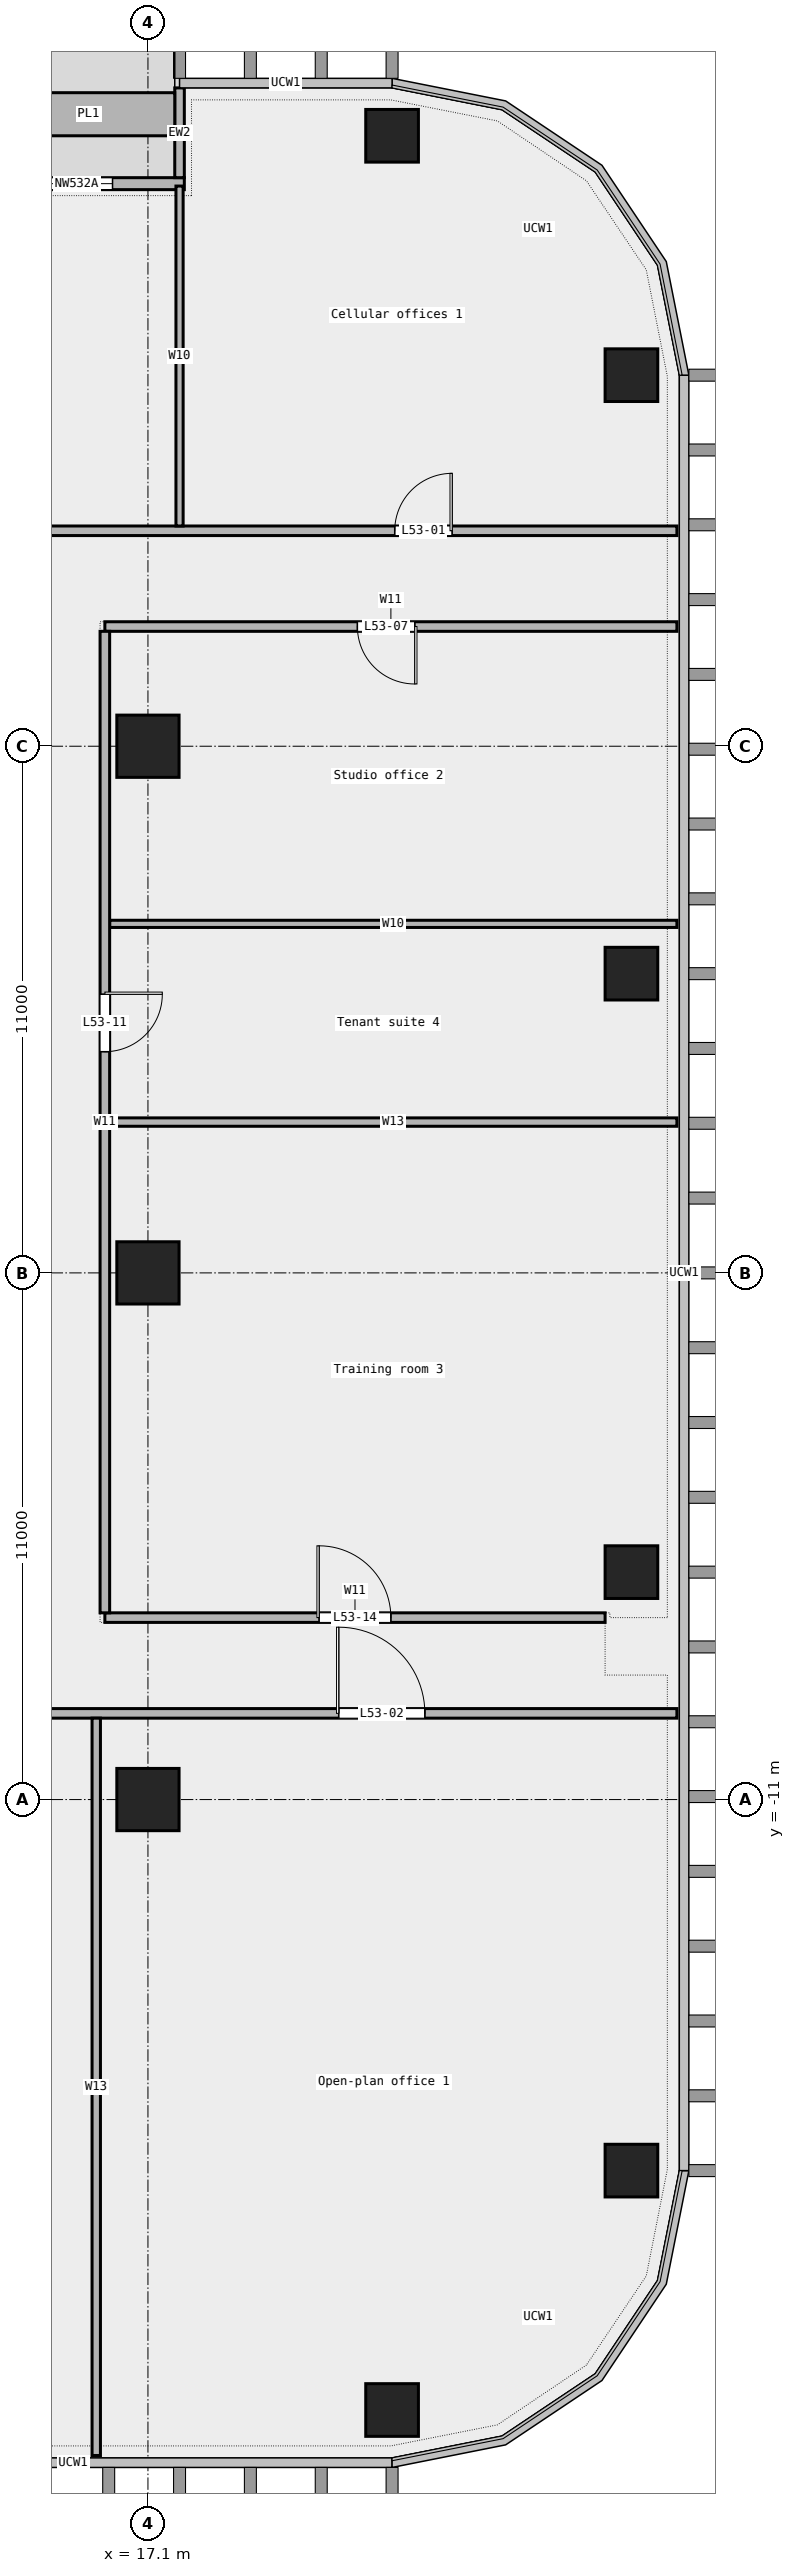
"""IFC4 building model, lengths in metres.
Left out: names, types, materials, properties, quantities, classifications, styles, units other than length and angle.
Written with IfcOpenShell. Run it as: python <this file> out.ifc"""

import sys

from ifc_helpers import new_model, si_unit, direction, frame, frame_2d, origin, origin_2d, place, context, subcontext, project, spatial, rectangle, extrude, element, fill, save


model = new_model("IFC4")
c1 = context("Model", 3, precision=1e-05, world=origin(), true_north=direction((0.0, 1.0)))
c2 = subcontext(c1, "Body", "Model", "MODEL_VIEW")
j1 = project(units=[si_unit("LENGTHUNIT", "METRE"), si_unit("PLANEANGLEUNIT", "RADIAN")], contexts=[c1])
p1 = place(None, origin())
s1 = spatial("IfcSite", under=j1, at=p1, CompositionType="ELEMENT")
p2 = place(p1, origin())
s2 = spatial("IfcBuilding", under=s1, at=p2, CompositionType="ELEMENT")
p3 = place(p2, frame((0.0, 0.0, 247.0)))
s3 = spatial("IfcBuildingStorey", under=s2, at=p3, CompositionType="ELEMENT", Elevation=247.0)
for number, where, z_axis, x_axis in (
    (1, (22.2, -23.75, 0.0), (0.0, 0.0, 1.0), (1.0, 0.0, 0.0)),
    (2, (27.2, -18.75, 0.0), (0.0, 0.0, 1.0), (1.0, 0.0, 0.0)),
    (3, (27.2, -6.25, 0.0), (0.0, 0.0, 1.0), (1.0, 0.0, 0.0)),
    (4, (27.2, 6.25, 0.0), (0.0, 0.0, 1.0), (1.0, 0.0, 0.0)),
    (5, (27.2, 18.75, 0.0), (0.0, 0.0, 1.0), (1.0, 0.0, 0.0)),
    (6, (22.2, 23.75, 0.0), (0.0, 0.0, 1.0), (1.0, 0.0, 0.0)),
):
    element("IfcColumn", number, at=place(p3, frame(where, z_axis=z_axis, x_axis=x_axis)), inside=s3, PredefinedType="COLUMN", context=c2, shape_type="SweptSolid", body=[
        extrude(rectangle(XDim=1.1, YDim=1.1, at=origin_2d()), origin(), (0.0, 0.0, 1.0), 3.6),
    ])
for number, where, z_axis, x_axis in (
    (7, (17.1, -11.0, 0.0), (0.0, 0.0, 1.0), (1.0, 0.0, 0.0)),
    (8, (17.1, 0.0, 0.0), (0.0, 0.0, 1.0), (1.0, 0.0, 0.0)),
    (9, (17.1, 11.0, 0.0), (0.0, 0.0, 1.0), (1.0, 0.0, 0.0)),
):
    element("IfcColumn", number, at=place(p3, frame(where, z_axis=z_axis, x_axis=x_axis)), inside=s3, PredefinedType="COLUMN", context=c2, shape_type="SweptSolid", body=[
        extrude(rectangle(XDim=1.3, YDim=1.3, at=origin_2d()), origin(), (0.0, 0.0, 1.0), 3.6),
    ])
p4 = place(p3, frame((17.86, 22.75, 0.0), z_axis=(0.0, 0.0, 1.0), x_axis=(-1.0, 0.0, 0.0)))
e10 = element("IfcWall", 10, at=p4, inside=s3, PredefinedType="STANDARD", context=c2, shape_type="SweptSolid", body=[
    extrude(rectangle(XDim=13.52, YDim=0.25, at=frame_2d((6.76, 0.0))), origin(), (0.0, 0.0, 1.0), 3.6),
])
p5 = place(p4, frame((1.5, 0.0, 0.45)))
e11 = element("IfcOpeningElement", 11, at=p5, cuts=e10, PredefinedType="OPENING", context=c2, shape_type="SweptSolid", body=[
    extrude(rectangle(XDim=1.5, YDim=2.4, at=frame_2d((0.75, 1.2))), frame((0.0, 0.137, 0.0), z_axis=(0.0, -1.0, 0.0), x_axis=(1.0, 0.0, 0.0)), (0.0, 0.0, 1.0), 0.274),
])
p6 = place(p4, frame((4.0, 0.0, 0.0)))
e12 = element("IfcOpeningElement", 12, at=p6, cuts=e10, PredefinedType="OPENING", context=c2, shape_type="SweptSolid", body=[
    extrude(rectangle(XDim=1.8, YDim=2.4, at=frame_2d((0.9, 1.2))), frame((0.0, 0.137, 0.0), z_axis=(0.0, -1.0, 0.0), x_axis=(1.0, 0.0, 0.0)), (0.0, 0.0, 1.0), 0.274),
])
p7 = place(p4, frame((10.5, 0.0, 0.45)))
e13 = element("IfcOpeningElement", 13, at=p7, cuts=e10, PredefinedType="OPENING", context=c2, shape_type="SweptSolid", body=[
    extrude(rectangle(XDim=1.5, YDim=2.4, at=frame_2d((0.75, 1.2))), frame((0.0, 0.137, 0.0), z_axis=(0.0, -1.0, 0.0), x_axis=(1.0, 0.0, 0.0)), (0.0, 0.0, 1.0), 0.274),
])
p8 = place(p3, frame((17.76, 24.75, 0.0), z_axis=(0.0, 0.0, 1.0), x_axis=(0.0, -1.0, 0.0)))
e14 = element("IfcWall", 14, at=p8, inside=s3, PredefinedType="STANDARD", context=c2, shape_type="SweptSolid", body=[
    extrude(rectangle(XDim=1.875, YDim=0.2, at=frame_2d((0.938, 0.0))), origin(), (0.0, 0.0, 1.0), 3.6),
])
p9 = place(p3, frame((17.66, 24.2, 0.0), z_axis=(0.0, 0.0, 1.0), x_axis=(-1.0, 0.0, 0.0)))
e15 = element("IfcWall", 15, at=p9, inside=s3, PredefinedType="STANDARD", context=c2, shape_type="SweptSolid", body=[
    extrude(rectangle(XDim=3.6, YDim=0.9, at=frame_2d((1.8, 0.0))), origin(), (0.0, 0.0, 1.0), 0.7),
])
p10 = place(p3, frame((-4.44, -9.2, 0.0), z_axis=(0.0, 0.0, 1.0), x_axis=(1.0, 0.0, 0.0)))
e16 = element("IfcWall", 16, at=p10, inside=s3, PredefinedType="PARTITIONING", context=c2, shape_type="SweptSolid", body=[
    extrude(rectangle(XDim=32.59, YDim=0.2, at=frame_2d((16.295, 0.0))), origin(), (0.0, 0.0, 1.0), 3.6),
])
p11 = place(p10, frame((25.525, 0.0, 0.0)))
e17 = element("IfcOpeningElement", 17, at=p11, cuts=e16, PredefinedType="OPENING", context=c2, shape_type="SweptSolid", body=[
    extrude(rectangle(XDim=1.8, YDim=2.1, at=frame_2d((0.9, 1.05))), frame((0.0, 0.112, 0.0), z_axis=(0.0, -1.0, 0.0), x_axis=(1.0, 0.0, 0.0)), (0.0, 0.0, 1.0), 0.224),
])
p12 = place(p10, frame((5.76, 0.0, 0.0)))
e18 = element("IfcOpeningElement", 18, at=p12, cuts=e16, PredefinedType="OPENING", context=c2, shape_type="SweptSolid", body=[
    extrude(rectangle(XDim=1.8, YDim=2.1, at=frame_2d((0.9, 1.05))), frame((0.0, 0.112, 0.0), z_axis=(0.0, -1.0, 0.0), x_axis=(1.0, 0.0, 0.0)), (0.0, 0.0, 1.0), 0.224),
])
p13 = place(p10, frame((16.14, 0.0, 0.0)))
e19 = element("IfcOpeningElement", 19, at=p13, cuts=e16, PredefinedType="OPENING", context=c2, shape_type="SweptSolid", body=[
    extrude(rectangle(XDim=1.5, YDim=2.1, at=frame_2d((0.75, 1.05))), frame((0.0, 0.112, 0.0), z_axis=(0.0, -1.0, 0.0), x_axis=(1.0, 0.0, 0.0)), (0.0, 0.0, 1.0), 0.224),
])
p14 = place(p3, frame((16.2, -7.2, 0.0), z_axis=(0.0, 0.0, 1.0), x_axis=(1.0, 0.0, 0.0)))
e20 = element("IfcWall", 20, at=p14, inside=s3, PredefinedType="PARTITIONING", context=c2, shape_type="SweptSolid", body=[
    extrude(rectangle(XDim=10.45, YDim=0.2, at=frame_2d((5.225, 0.0))), origin(), (0.0, 0.0, 1.0), 3.6),
])
p15 = place(p14, frame((4.475, 0.0, 0.0)))
e21 = element("IfcOpeningElement", 21, at=p15, cuts=e20, PredefinedType="OPENING", context=c2, shape_type="SweptSolid", body=[
    extrude(rectangle(XDim=1.5, YDim=2.1, at=frame_2d((0.75, 1.05))), frame((0.0, 0.112, 0.0), z_axis=(0.0, -1.0, 0.0), x_axis=(1.0, 0.0, 0.0)), (0.0, 0.0, 1.0), 0.224),
])
p16 = place(p3, frame((16.3, 3.15, 0.0), z_axis=(0.0, 0.0, 1.0), x_axis=(1.0, 0.0, 0.0)))
e22 = element("IfcWall", 22, at=p16, inside=s3, PredefinedType="PARTITIONING", context=c2, shape_type="SweptSolid", body=[
    extrude(rectangle(XDim=11.85, YDim=0.175, at=frame_2d((5.925, 0.0))), origin(), (0.0, 0.0, 1.0), 3.6),
])
p17 = place(p3, frame((16.3, 7.29, 0.0), z_axis=(0.0, 0.0, 1.0), x_axis=(1.0, 0.0, 0.0)))
e23 = element("IfcWall", 23, at=p17, inside=s3, PredefinedType="PARTITIONING", context=c2, shape_type="SweptSolid", body=[
    extrude(rectangle(XDim=11.85, YDim=0.15, at=frame_2d((5.925, 0.0))), origin(), (0.0, 0.0, 1.0), 3.6),
])
p18 = place(p3, frame((16.2, 13.5, 0.0), z_axis=(0.0, 0.0, 1.0), x_axis=(1.0, 0.0, 0.0)))
e24 = element("IfcWall", 24, at=p18, inside=s3, PredefinedType="PARTITIONING", context=c2, shape_type="SweptSolid", body=[
    extrude(rectangle(XDim=11.95, YDim=0.2, at=frame_2d((5.975, 0.0))), origin(), (0.0, 0.0, 1.0), 3.6),
])
p19 = place(p18, frame((5.275, 0.0, 0.0)))
e25 = element("IfcOpeningElement", 25, at=p19, cuts=e24, PredefinedType="OPENING", context=c2, shape_type="SweptSolid", body=[
    extrude(rectangle(XDim=1.2, YDim=2.1, at=frame_2d((0.6, 1.05))), frame((0.0, 0.112, 0.0), z_axis=(0.0, -1.0, 0.0), x_axis=(1.0, 0.0, 0.0)), (0.0, 0.0, 1.0), 0.224),
])
p20 = place(p3, frame((-28.15, 15.5, 0.0), z_axis=(0.0, 0.0, 1.0), x_axis=(1.0, 0.0, 0.0)))
e26 = element("IfcWall", 26, at=p20, inside=s3, PredefinedType="PARTITIONING", context=c2, shape_type="SweptSolid", body=[
    extrude(rectangle(XDim=56.3, YDim=0.2, at=frame_2d((28.15, 0.0))), origin(), (0.0, 0.0, 1.0), 3.6),
])
p21 = place(p20, frame((50.405, 0.0, 0.0)))
e27 = element("IfcOpeningElement", 27, at=p21, cuts=e26, PredefinedType="OPENING", context=c2, shape_type="SweptSolid", body=[
    extrude(rectangle(XDim=1.2, YDim=2.1, at=frame_2d((0.6, 1.05))), frame((0.0, 0.112, 0.0), z_axis=(0.0, -1.0, 0.0), x_axis=(1.0, 0.0, 0.0)), (0.0, 0.0, 1.0), 0.224),
])
p22 = place(p20, frame((38.5, 0.0, 0.0)))
e28 = element("IfcOpeningElement", 28, at=p22, cuts=e26, PredefinedType="OPENING", context=c2, shape_type="SweptSolid", body=[
    extrude(rectangle(XDim=1.5, YDim=2.1, at=frame_2d((0.75, 1.05))), frame((0.0, 0.112, 0.0), z_axis=(0.0, -1.0, 0.0), x_axis=(1.0, 0.0, 0.0)), (0.0, 0.0, 1.0), 0.224),
])
p23 = place(p20, frame((30.853, 0.0, 0.0)))
e29 = element("IfcOpeningElement", 29, at=p23, cuts=e26, PredefinedType="OPENING", context=c2, shape_type="SweptSolid", body=[
    extrude(rectangle(XDim=0.9, YDim=2.1, at=frame_2d((0.45, 1.05))), frame((0.0, 0.112, 0.0), z_axis=(0.0, -1.0, 0.0), x_axis=(1.0, 0.0, 0.0)), (0.0, 0.0, 1.0), 0.224),
])
p24 = place(p20, frame((19.798, 0.0, 0.0)))
e30 = element("IfcOpeningElement", 30, at=p24, cuts=e26, PredefinedType="OPENING", context=c2, shape_type="SweptSolid", body=[
    extrude(rectangle(XDim=1.8, YDim=2.1, at=frame_2d((0.9, 1.05))), frame((0.0, 0.112, 0.0), z_axis=(0.0, -1.0, 0.0), x_axis=(1.0, 0.0, 0.0)), (0.0, 0.0, 1.0), 0.224),
])
p25 = place(p20, frame((5.04, 0.0, 0.0)))
e31 = element("IfcOpeningElement", 31, at=p25, cuts=e26, PredefinedType="OPENING", context=c2, shape_type="SweptSolid", body=[
    extrude(rectangle(XDim=1.5, YDim=2.1, at=frame_2d((0.75, 1.05))), frame((0.0, 0.112, 0.0), z_axis=(0.0, -1.0, 0.0), x_axis=(1.0, 0.0, 0.0)), (0.0, 0.0, 1.0), 0.224),
])
p26 = place(p3, frame((16.02, -24.7, 0.0), z_axis=(0.0, 0.0, 1.0), x_axis=(0.0, 1.0, 0.0)))
e32 = element("IfcWall", 32, at=p26, inside=s3, PredefinedType="PARTITIONING", context=c2, shape_type="SweptSolid", body=[
    extrude(rectangle(XDim=15.4, YDim=0.175, at=frame_2d((7.7, 0.0))), origin(), (0.0, 0.0, 1.0), 3.6),
])
p27 = place(p3, frame((16.2, -7.1, 0.0), z_axis=(0.0, 0.0, 1.0), x_axis=(0.0, 1.0, 0.0)))
e33 = element("IfcWall", 33, at=p27, inside=s3, PredefinedType="PARTITIONING", context=c2, shape_type="SweptSolid", body=[
    extrude(rectangle(XDim=20.5, YDim=0.2, at=frame_2d((10.25, 0.0))), origin(), (0.0, 0.0, 1.0), 3.6),
])
p28 = place(p27, frame((11.72, 0.0, 0.0)))
e34 = element("IfcOpeningElement", 34, at=p28, cuts=e33, PredefinedType="OPENING", context=c2, shape_type="SweptSolid", body=[
    extrude(rectangle(XDim=1.2, YDim=2.1, at=frame_2d((0.6, 1.05))), frame((0.0, 0.112, 0.0), z_axis=(0.0, -1.0, 0.0), x_axis=(1.0, 0.0, 0.0)), (0.0, 0.0, 1.0), 0.224),
])
p29 = place(p3, frame((17.76, 15.6, 0.0), z_axis=(0.0, 0.0, 1.0), x_axis=(0.0, 1.0, 0.0)))
e35 = element("IfcWall", 35, at=p29, inside=s3, PredefinedType="PARTITIONING", context=c2, shape_type="SweptSolid", body=[
    extrude(rectangle(XDim=7.1, YDim=0.15, at=frame_2d((3.55, 0.0))), origin(), (0.0, 0.0, 1.0), 3.6),
])
p30 = place(p5, origin())
e36 = element("IfcWindow", 36, at=p30, inside=s3, PartitioningType="SINGLE_PANEL", PredefinedType="WINDOW", context=c2, shape_type="SweptSolid", body=[
    extrude(rectangle(XDim=1.5, YDim=2.4, at=frame_2d((0.75, 1.2))), frame((0.0, 0.03, 0.0), z_axis=(0.0, -1.0, 0.0), x_axis=(1.0, 0.0, 0.0)), (0.0, 0.0, 1.0), 0.06),
])
fill(e11, e36)
p31 = place(p21, origin())
e37 = element("IfcDoor", 37, at=p31, inside=s3, OperationType="SINGLE_SWING_RIGHT", PredefinedType="DOOR", context=c2, shape_type="SweptSolid", body=[
    extrude(rectangle(XDim=1.2, YDim=2.1, at=frame_2d((0.6, 1.05))), frame((0.0, 0.025, 0.0), z_axis=(0.0, -1.0, 0.0), x_axis=(1.0, 0.0, 0.0)), (0.0, 0.0, 1.0), 0.05),
])
fill(e27, e37)
p32 = place(p11, origin())
e38 = element("IfcDoor", 38, at=p32, inside=s3, OperationType="DOUBLE_DOOR_SINGLE_SWING", PredefinedType="DOOR", context=c2, shape_type="SweptSolid", body=[
    extrude(rectangle(XDim=1.8, YDim=2.1, at=frame_2d((0.9, 1.05))), frame((0.0, 0.025, 0.0), z_axis=(0.0, -1.0, 0.0), x_axis=(1.0, 0.0, 0.0)), (0.0, 0.0, 1.0), 0.05),
])
fill(e17, e38)
p33 = place(p19, origin())
e39 = element("IfcDoor", 39, at=p33, inside=s3, OperationType="SINGLE_SWING_LEFT", PredefinedType="DOOR", context=c2, shape_type="SweptSolid", body=[
    extrude(rectangle(XDim=1.2, YDim=2.1, at=frame_2d((0.6, 1.05))), frame((0.0, 0.025, 0.0), z_axis=(0.0, -1.0, 0.0), x_axis=(1.0, 0.0, 0.0)), (0.0, 0.0, 1.0), 0.05),
])
fill(e25, e39)
p34 = place(p28, origin())
e40 = element("IfcDoor", 40, at=p34, inside=s3, OperationType="SINGLE_SWING_LEFT", PredefinedType="DOOR", context=c2, shape_type="SweptSolid", body=[
    extrude(rectangle(XDim=1.2, YDim=2.1, at=frame_2d((0.6, 1.05))), frame((0.0, 0.025, 0.0), z_axis=(0.0, -1.0, 0.0), x_axis=(1.0, 0.0, 0.0)), (0.0, 0.0, 1.0), 0.05),
])
fill(e34, e40)
p35 = place(p15, origin())
e41 = element("IfcDoor", 41, at=p35, inside=s3, OperationType="DOUBLE_DOOR_SINGLE_SWING", PredefinedType="DOOR", context=c2, shape_type="SweptSolid", body=[
    extrude(rectangle(XDim=1.5, YDim=2.1, at=frame_2d((0.75, 1.05))), frame((0.0, 0.025, 0.0), z_axis=(0.0, -1.0, 0.0), x_axis=(1.0, 0.0, 0.0)), (0.0, 0.0, 1.0), 0.05),
])
fill(e21, e41)
save(model, sys.argv[1])
